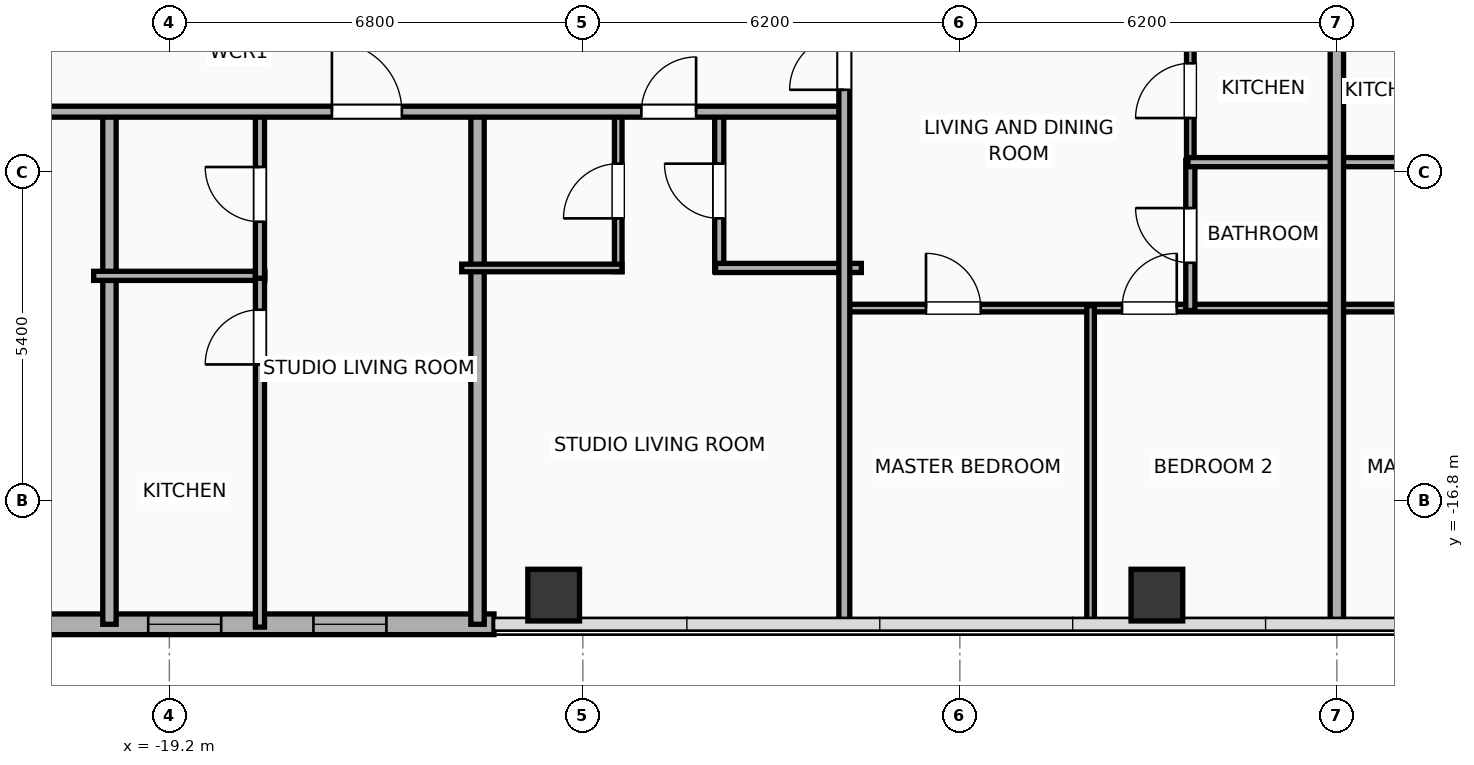
"""IFC4 building model, lengths in metres.
Left out: names, types, materials, properties, quantities, classifications, styles, units other than length and angle.
Written with IfcOpenShell. Run it as: python <this file> out.ifc"""

import sys

from ifc_helpers import new_model, si_unit, direction, frame, frame_2d, origin, origin_2d, place, context, subcontext, project, spatial, rectangle, hollow_rectangle, extrude, element, fill, save


model = new_model("IFC4")
c1 = context("Model", 3, precision=1e-05, world=origin(), true_north=direction((0.0, 1.0)))
c2 = subcontext(c1, "Body", "Model", "MODEL_VIEW")
j1 = project(units=[si_unit("LENGTHUNIT", "METRE"), si_unit("PLANEANGLEUNIT", "RADIAN")], contexts=[c1])
p1 = place(None, origin())
s1 = spatial("IfcSite", under=j1, at=p1, CompositionType="ELEMENT")
p2 = place(p1, origin())
s2 = spatial("IfcBuilding", under=s1, at=p2, CompositionType="ELEMENT")
p3 = place(p2, frame((0.0, 0.0, 208.0)))
s3 = spatial("IfcBuildingStorey", under=s2, at=p3, CompositionType="ELEMENT", Elevation=208.0)
for number, where, z_axis, x_axis in (
    (1, (-12.88, -18.35, 0.0), (0.0, 0.0, 1.0), (1.0, 0.0, 0.0)),
    (2, (-2.96, -18.35, 0.0), (0.0, 0.0, 1.0), (1.0, 0.0, 0.0)),
):
    element("IfcColumn", number, at=place(p3, frame(where, z_axis=z_axis, x_axis=x_axis)), inside=s3, PredefinedType="COLUMN", context=c2, shape_type="SweptSolid", body=[
        extrude(hollow_rectangle(XDim=0.85, YDim=0.85, WallThickness=0.028, at=origin_2d()), origin(), (0.0, 0.0, 1.0), 3.9),
    ])
p4 = place(p3, frame((-13.861, -18.83, 0.0), z_axis=(0.0, 0.0, 1.0), x_axis=(-1.0, 0.0, 0.0)))
e3 = element("IfcWall", 3, at=p4, inside=s3, PredefinedType="ELEMENTEDWALL", context=c2, shape_type="SweptSolid", body=[
    extrude(rectangle(XDim=8.922, YDim=0.34, at=frame_2d((4.461, 0.0))), origin(), (0.0, 0.0, 1.0), 3.65),
])
p5 = place(p4, frame((1.769, 0.0, 0.75)))
e4 = element("IfcOpeningElement", 4, at=p5, cuts=e3, PredefinedType="OPENING", context=c2, shape_type="SweptSolid", body=[
    extrude(rectangle(XDim=1.2, YDim=2.05, at=frame_2d((0.6, 1.025))), frame((0.0, 0.18, 0.0), z_axis=(0.0, -1.0, 0.0), x_axis=(1.0, 0.0, 0.0)), (0.0, 0.0, 1.0), 0.36),
])
p6 = place(p4, frame((4.486, 0.0, 0.75)))
e5 = element("IfcOpeningElement", 5, at=p6, cuts=e3, PredefinedType="OPENING", context=c2, shape_type="SweptSolid", body=[
    extrude(rectangle(XDim=1.2, YDim=2.05, at=frame_2d((0.6, 1.025))), frame((0.0, 0.18, 0.0), z_axis=(0.0, -1.0, 0.0), x_axis=(1.0, 0.0, 0.0)), (0.0, 0.0, 1.0), 0.36),
])
p7 = place(p3, frame((-20.185, -18.83, 0.0), z_axis=(0.0, 0.0, 1.0), x_axis=(0.0, 1.0, 0.0)))
e6 = element("IfcWall", 6, at=p7, inside=s3, PredefinedType="PARTITIONING", context=c2, shape_type="SweptSolid", body=[
    extrude(rectangle(XDim=8.51, YDim=0.22, at=frame_2d((4.255, 0.0))), origin(), (0.0, 0.0, 1.0), 3.09),
])
p8 = place(p3, frame((-20.445, -13.1, 0.0), z_axis=(0.0, 0.0, 1.0), x_axis=(1.0, 0.0, 0.0)))
e7 = element("IfcWall", 7, at=p8, inside=s3, PredefinedType="PLUMBINGWALL", context=c2, shape_type="SweptSolid", body=[
    extrude(rectangle(XDim=2.815, YDim=0.15, at=frame_2d((1.408, 0.0))), origin(), (0.0, 0.0, 1.0), 3.65),
])
p9 = place(p3, frame((-17.71, -18.877, 0.0), z_axis=(0.0, 0.0, 1.0), x_axis=(0.0, 1.0, 0.0)))
e8 = element("IfcWall", 8, at=p9, inside=s3, PredefinedType="PLUMBINGWALL", context=c2, shape_type="SweptSolid", body=[
    extrude(rectangle(XDim=5.817, YDim=0.15, at=frame_2d((2.908, 0.0))), origin(), (0.0, 0.0, 1.0), 3.65),
])
p10 = place(p9, frame((4.32, 0.0, 0.0)))
e9 = element("IfcOpeningElement", 9, at=p10, cuts=e8, PredefinedType="OPENING", context=c2, shape_type="SweptSolid", body=[
    extrude(rectangle(XDim=0.9, YDim=2.05, at=frame_2d((0.45, 1.025))), frame((0.0, 0.085, 0.0), z_axis=(0.0, -1.0, 0.0), x_axis=(1.0, 0.0, 0.0)), (0.0, 0.0, 1.0), 0.17),
])
p11 = place(p3, frame((-17.71, -13.14, 0.0), z_axis=(0.0, 0.0, 1.0), x_axis=(0.0, 1.0, 0.0)))
e10 = element("IfcWall", 10, at=p11, inside=s3, PredefinedType="PLUMBINGWALL", context=c2, shape_type="SweptSolid", body=[
    extrude(rectangle(XDim=2.76, YDim=0.15, at=frame_2d((1.38, 0.0))), origin(), (0.0, 0.0, 1.0), 3.65),
])
p12 = place(p11, frame((0.93, 0.0, 0.0)))
e11 = element("IfcOpeningElement", 11, at=p12, cuts=e10, PredefinedType="OPENING", context=c2, shape_type="SweptSolid", body=[
    extrude(rectangle(XDim=0.9, YDim=2.05, at=frame_2d((0.45, 1.025))), frame((0.0, 0.085, 0.0), z_axis=(0.0, -1.0, 0.0), x_axis=(1.0, 0.0, 0.0)), (0.0, 0.0, 1.0), 0.17),
])
p13 = place(p3, frame((-14.132, -18.83, 0.0), z_axis=(0.0, 0.0, 1.0), x_axis=(0.0, 1.0, 0.0)))
e12 = element("IfcWall", 12, at=p13, inside=s3, PredefinedType="PARTITIONING", context=c2, shape_type="SweptSolid", body=[
    extrude(rectangle(XDim=8.51, YDim=0.22, at=frame_2d((4.255, 0.0))), origin(), (0.0, 0.0, 1.0), 3.65),
])
p14 = place(p3, frame((-11.818, -13.03, 0.0), z_axis=(0.0, 0.0, 1.0), x_axis=(0.0, 1.0, 0.0)))
e13 = element("IfcWall", 13, at=p14, inside=s3, PredefinedType="PARTITIONING", context=c2, shape_type="SweptSolid", body=[
    extrude(rectangle(XDim=2.65, YDim=0.125, at=frame_2d((1.325, 0.0))), origin(), (0.0, 0.0, 1.0), 3.65),
])
p15 = place(p14, frame((0.875, 0.0, 0.0)))
e14 = element("IfcOpeningElement", 14, at=p15, cuts=e13, PredefinedType="OPENING", context=c2, shape_type="SweptSolid", body=[
    extrude(rectangle(XDim=0.9, YDim=2.05, at=frame_2d((0.45, 1.025))), frame((0.0, 0.073, 0.0), z_axis=(0.0, -1.0, 0.0), x_axis=(1.0, 0.0, 0.0)), (0.0, 0.0, 1.0), 0.145),
])
p16 = place(p3, frame((-10.157, -13.03, 0.0), z_axis=(0.0, 0.0, 1.0), x_axis=(0.0, 1.0, 0.0)))
e15 = element("IfcWall", 15, at=p16, inside=s3, PredefinedType="PLUMBINGWALL", context=c2, shape_type="SweptSolid", body=[
    extrude(rectangle(XDim=2.65, YDim=0.15, at=frame_2d((1.325, 0.0))), origin(), (0.0, 0.0, 1.0), 3.65),
])
p17 = place(p16, frame((0.875, 0.0, 0.0)))
e16 = element("IfcOpeningElement", 16, at=p17, cuts=e15, PredefinedType="OPENING", context=c2, shape_type="SweptSolid", body=[
    extrude(rectangle(XDim=0.9, YDim=2.05, at=frame_2d((0.45, 1.025))), frame((0.0, 0.085, 0.0), z_axis=(0.0, -1.0, 0.0), x_axis=(1.0, 0.0, 0.0)), (0.0, 0.0, 1.0), 0.17),
])
p18 = place(p3, frame((-14.392, -12.97, 0.0), z_axis=(0.0, 0.0, 1.0), x_axis=(1.0, 0.0, 0.0)))
e17 = element("IfcWall", 17, at=p18, inside=s3, PredefinedType="PARTITIONING", context=c2, shape_type="SweptSolid", body=[
    extrude(rectangle(XDim=2.634, YDim=0.125, at=frame_2d((1.317, 0.0))), origin(), (0.0, 0.0, 1.0), 3.65),
])
p19 = place(p3, frame((-10.217, -12.97, 0.0), z_axis=(0.0, 0.0, 1.0), x_axis=(1.0, 0.0, 0.0)))
e18 = element("IfcWall", 18, at=p19, inside=s3, PredefinedType="PLUMBINGWALL", context=c2, shape_type="SweptSolid", body=[
    extrude(rectangle(XDim=2.397, YDim=0.15, at=frame_2d((1.198, 0.0))), origin(), (0.0, 0.0, 1.0), 3.65),
])
p20 = place(p3, frame((-26.23, -10.4, 0.0), z_axis=(0.0, 0.0, 1.0), x_axis=(1.0, 0.0, 0.0)))
e19 = element("IfcWall", 19, at=p20, inside=s3, PredefinedType="PARTITIONING", context=c2, shape_type="SweptSolid", body=[
    extrude(rectangle(XDim=18.15, YDim=0.18, at=frame_2d((9.075, 0.0))), origin(), (0.0, 0.0, 1.0), 3.65),
])
p21 = place(p20, frame((2.414, 0.0, 0.0)))
e20 = element("IfcOpeningElement", 20, at=p21, cuts=e19, PredefinedType="OPENING", context=c2, shape_type="SweptSolid", body=[
    extrude(rectangle(XDim=1.15, YDim=2.05, at=frame_2d((0.575, 1.025))), frame((0.0, 0.1, 0.0), z_axis=(0.0, -1.0, 0.0), x_axis=(1.0, 0.0, 0.0)), (0.0, 0.0, 1.0), 0.2),
])
p22 = place(p20, frame((9.703, 0.0, 0.0)))
e21 = element("IfcOpeningElement", 21, at=p22, cuts=e19, PredefinedType="OPENING", context=c2, shape_type="SweptSolid", body=[
    extrude(rectangle(XDim=1.15, YDim=2.05, at=frame_2d((0.575, 1.025))), frame((0.0, 0.1, 0.0), z_axis=(0.0, -1.0, 0.0), x_axis=(1.0, 0.0, 0.0)), (0.0, 0.0, 1.0), 0.2),
])
p23 = place(p20, frame((14.792, 0.0, 0.0)))
e22 = element("IfcOpeningElement", 22, at=p23, cuts=e19, PredefinedType="OPENING", context=c2, shape_type="SweptSolid", body=[
    extrude(rectangle(XDim=0.9, YDim=2.05, at=frame_2d((0.45, 1.025))), frame((0.0, 0.1, 0.0), z_axis=(0.0, -1.0, 0.0), x_axis=(1.0, 0.0, 0.0)), (0.0, 0.0, 1.0), 0.2),
])
p24 = place(p3, frame((-8.08, -13.63, 0.0), z_axis=(0.0, 0.0, 1.0), x_axis=(1.0, 0.0, 0.0)))
e23 = element("IfcWall", 23, at=p24, inside=s3, PredefinedType="PARTITIONING", context=c2, shape_type="SweptSolid", body=[
    extrude(rectangle(XDim=8.06, YDim=0.125, at=frame_2d((4.03, 0.0))), origin(), (0.0, 0.0, 1.0), 3.65),
])
p25 = place(p24, frame((1.323, 0.0, 0.0)))
e24 = element("IfcOpeningElement", 24, at=p25, cuts=e23, PredefinedType="OPENING", context=c2, shape_type="SweptSolid", body=[
    extrude(rectangle(XDim=0.9, YDim=2.05, at=frame_2d((0.45, 1.025))), frame((0.0, 0.073, 0.0), z_axis=(0.0, -1.0, 0.0), x_axis=(1.0, 0.0, 0.0)), (0.0, 0.0, 1.0), 0.145),
])
p26 = place(p24, frame((4.547, 0.0, 0.0)))
e25 = element("IfcOpeningElement", 25, at=p26, cuts=e23, PredefinedType="OPENING", context=c2, shape_type="SweptSolid", body=[
    extrude(rectangle(XDim=0.9, YDim=2.05, at=frame_2d((0.45, 1.025))), frame((0.0, 0.073, 0.0), z_axis=(0.0, -1.0, 0.0), x_axis=(1.0, 0.0, 0.0)), (0.0, 0.0, 1.0), 0.145),
])
p27 = place(p3, frame((-2.41, -11.26, 0.0), z_axis=(0.0, 0.0, 1.0), x_axis=(0.0, 1.0, 0.0)))
e26 = element("IfcWall", 26, at=p27, inside=s3, PredefinedType="PARTITIONING", context=c2, shape_type="SweptSolid", body=[
    extrude(rectangle(XDim=2.41, YDim=0.125, at=frame_2d((1.205, 0.0))), origin(), (0.0, 0.0, 1.0), 3.65),
])
p28 = place(p27, frame((0.755, 0.0, 0.0)))
e27 = element("IfcOpeningElement", 27, at=p28, cuts=e26, PredefinedType="OPENING", context=c2, shape_type="SweptSolid", body=[
    extrude(rectangle(XDim=0.9, YDim=2.05, at=frame_2d((0.45, 1.025))), frame((0.0, 0.073, 0.0), z_axis=(0.0, -1.0, 0.0), x_axis=(1.0, 0.0, 0.0)), (0.0, 0.0, 1.0), 0.145),
])
p29 = place(p3, frame((-2.41, -13.67, 0.0), z_axis=(0.0, 0.0, 1.0), x_axis=(0.0, 1.0, 0.0)))
e28 = element("IfcWall", 28, at=p29, inside=s3, PredefinedType="PLUMBINGWALL", context=c2, shape_type="SweptSolid", body=[
    extrude(rectangle(XDim=2.47, YDim=0.15, at=frame_2d((1.235, 0.0))), origin(), (0.0, 0.0, 1.0), 3.65),
])
p30 = place(p29, frame((0.785, 0.0, 0.0)))
e29 = element("IfcOpeningElement", 29, at=p30, cuts=e28, PredefinedType="OPENING", context=c2, shape_type="SweptSolid", body=[
    extrude(rectangle(XDim=0.9, YDim=2.05, at=frame_2d((0.45, 1.025))), frame((0.0, 0.085, 0.0), z_axis=(0.0, -1.0, 0.0), x_axis=(1.0, 0.0, 0.0)), (0.0, 0.0, 1.0), 0.17),
])
p31 = place(p3, frame((-2.45, -11.23, 0.0), z_axis=(0.0, 0.0, 1.0), x_axis=(1.0, 0.0, 0.0)))
e30 = element("IfcWall", 30, at=p31, inside=s3, PredefinedType="PLUMBINGWALL", context=c2, shape_type="SweptSolid", body=[
    extrude(rectangle(XDim=2.43, YDim=0.15, at=frame_2d((1.215, 0.0))), origin(), (0.0, 0.0, 1.0), 3.65),
])
p32 = place(p3, frame((-4.05, -18.83, 0.0), z_axis=(0.0, 0.0, 1.0), x_axis=(0.0, 1.0, 0.0)))
e31 = element("IfcWall", 31, at=p32, inside=s3, PredefinedType="PARTITIONING", context=c2, shape_type="SweptSolid", body=[
    extrude(rectangle(XDim=5.24, YDim=0.125, at=frame_2d((2.62, 0.0))), origin(), (0.0, 0.0, 1.0), 3.65),
])
p33 = place(p3, frame((-8.1, -18.83, 0.0), z_axis=(0.0, 0.0, 1.0), x_axis=(0.0, 1.0, 0.0)))
e32 = element("IfcWall", 32, at=p33, inside=s3, PredefinedType="PARTITIONING", context=c2, shape_type="SweptSolid", body=[
    extrude(rectangle(XDim=10.04, YDim=0.18, at=frame_2d((5.02, 0.0))), origin(), (0.0, 0.0, 1.0), 3.65),
])
p34 = place(p33, frame((8.79, 0.0, 0.0)))
e33 = element("IfcOpeningElement", 33, at=p34, cuts=e32, PredefinedType="OPENING", context=c2, shape_type="SweptSolid", body=[
    extrude(rectangle(XDim=0.9, YDim=2.05, at=frame_2d((0.45, 1.025))), frame((0.0, 0.1, 0.0), z_axis=(0.0, -1.0, 0.0), x_axis=(1.0, 0.0, 0.0)), (0.0, 0.0, 1.0), 0.2),
])
p35 = place(p3, frame((0.02, -13.63, 0.0), z_axis=(0.0, 0.0, 1.0), x_axis=(1.0, 0.0, 0.0)))
e34 = element("IfcWall", 34, at=p35, inside=s3, PredefinedType="PARTITIONING", context=c2, shape_type="SweptSolid", body=[
    extrude(rectangle(XDim=8.06, YDim=0.125, at=frame_2d((4.03, 0.0))), origin(), (0.0, 0.0, 1.0), 3.65),
])
p36 = place(p35, frame((1.323, 0.0, 0.0)))
e35 = element("IfcOpeningElement", 35, at=p36, cuts=e34, PredefinedType="OPENING", context=c2, shape_type="SweptSolid", body=[
    extrude(rectangle(XDim=0.9, YDim=2.05, at=frame_2d((0.45, 1.025))), frame((0.0, 0.073, 0.0), z_axis=(0.0, -1.0, 0.0), x_axis=(1.0, 0.0, 0.0)), (0.0, 0.0, 1.0), 0.145),
])
p37 = place(p35, frame((5.837, 0.0, 0.0)))
e36 = element("IfcOpeningElement", 36, at=p37, cuts=e34, PredefinedType="OPENING", context=c2, shape_type="SweptSolid", body=[
    extrude(rectangle(XDim=0.9, YDim=2.05, at=frame_2d((0.45, 1.025))), frame((0.0, 0.073, 0.0), z_axis=(0.0, -1.0, 0.0), x_axis=(1.0, 0.0, 0.0)), (0.0, 0.0, 1.0), 0.145),
])
p38 = place(p3, frame((0.02, -11.23, 0.0), z_axis=(0.0, 0.0, 1.0), x_axis=(1.0, 0.0, 0.0)))
e37 = element("IfcWall", 37, at=p38, inside=s3, PredefinedType="PLUMBINGWALL", context=c2, shape_type="SweptSolid", body=[
    extrude(rectangle(XDim=2.43, YDim=0.15, at=frame_2d((1.215, 0.0))), origin(), (0.0, 0.0, 1.0), 3.65),
])
p39 = place(p3, frame((0.0, -18.83, 0.0), z_axis=(0.0, 0.0, 1.0), x_axis=(0.0, 1.0, 0.0)))
e38 = element("IfcWall", 38, at=p39, inside=s3, PredefinedType="PARTITIONING", context=c2, shape_type="SweptSolid", body=[
    extrude(rectangle(XDim=10.04, YDim=0.22, at=frame_2d((5.02, 0.0))), origin(), (0.0, 0.0, 1.0), 3.65),
])
p40 = place(p5, origin())
e39 = element("IfcWindow", 39, at=p40, inside=s3, PartitioningType="SINGLE_PANEL", PredefinedType="WINDOW", context=c2, shape_type="SweptSolid", body=[
    extrude(rectangle(XDim=1.2, YDim=2.05, at=frame_2d((0.6, 1.025))), frame((0.0, 0.03, 0.0), z_axis=(0.0, -1.0, 0.0), x_axis=(1.0, 0.0, 0.0)), (0.0, 0.0, 1.0), 0.06),
])
fill(e4, e39)
p41 = place(p6, origin())
e40 = element("IfcWindow", 40, at=p41, inside=s3, PartitioningType="SINGLE_PANEL", PredefinedType="WINDOW", context=c2, shape_type="SweptSolid", body=[
    extrude(rectangle(XDim=1.2, YDim=2.05, at=frame_2d((0.6, 1.025))), frame((0.0, 0.03, 0.0), z_axis=(0.0, -1.0, 0.0), x_axis=(1.0, 0.0, 0.0)), (0.0, 0.0, 1.0), 0.06),
])
fill(e5, e40)
p42 = place(p10, origin())
e41 = element("IfcDoor", 41, at=p42, inside=s3, OperationType="SINGLE_SWING_LEFT", PredefinedType="DOOR", context=c2, shape_type="SweptSolid", body=[
    extrude(rectangle(XDim=0.9, YDim=2.05, at=frame_2d((0.45, 1.025))), frame((0.0, 0.025, 0.0), z_axis=(0.0, -1.0, 0.0), x_axis=(1.0, 0.0, 0.0)), (0.0, 0.0, 1.0), 0.05),
])
fill(e9, e41)
p43 = place(p12, origin())
e42 = element("IfcDoor", 42, at=p43, inside=s3, OperationType="SINGLE_SWING_RIGHT", PredefinedType="DOOR", context=c2, shape_type="SweptSolid", body=[
    extrude(rectangle(XDim=0.9, YDim=2.05, at=frame_2d((0.45, 1.025))), frame((0.0, 0.025, 0.0), z_axis=(0.0, -1.0, 0.0), x_axis=(1.0, 0.0, 0.0)), (0.0, 0.0, 1.0), 0.05),
])
fill(e11, e42)
p44 = place(p15, origin())
e43 = element("IfcDoor", 43, at=p44, inside=s3, OperationType="SINGLE_SWING_LEFT", PredefinedType="DOOR", context=c2, shape_type="SweptSolid", body=[
    extrude(rectangle(XDim=0.9, YDim=2.05, at=frame_2d((0.45, 1.025))), frame((0.0, 0.025, 0.0), z_axis=(0.0, -1.0, 0.0), x_axis=(1.0, 0.0, 0.0)), (0.0, 0.0, 1.0), 0.05),
])
fill(e14, e43)
p45 = place(p17, origin())
e44 = element("IfcDoor", 44, at=p45, inside=s3, OperationType="SINGLE_SWING_RIGHT", PredefinedType="DOOR", context=c2, shape_type="SweptSolid", body=[
    extrude(rectangle(XDim=0.9, YDim=2.05, at=frame_2d((0.45, 1.025))), frame((0.0, 0.025, 0.0), z_axis=(0.0, -1.0, 0.0), x_axis=(1.0, 0.0, 0.0)), (0.0, 0.0, 1.0), 0.05),
])
fill(e16, e44)
p46 = place(p22, origin())
e45 = element("IfcDoor", 45, at=p46, inside=s3, OperationType="SINGLE_SWING_LEFT", PredefinedType="DOOR", context=c2, shape_type="SweptSolid", body=[
    extrude(rectangle(XDim=1.15, YDim=2.05, at=frame_2d((0.575, 1.025))), frame((0.0, 0.025, 0.0), z_axis=(0.0, -1.0, 0.0), x_axis=(1.0, 0.0, 0.0)), (0.0, 0.0, 1.0), 0.05),
])
fill(e21, e45)
p47 = place(p23, origin())
e46 = element("IfcDoor", 46, at=p47, inside=s3, OperationType="SINGLE_SWING_RIGHT", PredefinedType="DOOR", context=c2, shape_type="SweptSolid", body=[
    extrude(rectangle(XDim=0.9, YDim=2.05, at=frame_2d((0.45, 1.025))), frame((0.0, 0.025, 0.0), z_axis=(0.0, -1.0, 0.0), x_axis=(1.0, 0.0, 0.0)), (0.0, 0.0, 1.0), 0.05),
])
fill(e22, e46)
p48 = place(p25, origin())
e47 = element("IfcDoor", 47, at=p48, inside=s3, OperationType="SINGLE_SWING_LEFT", PredefinedType="DOOR", context=c2, shape_type="SweptSolid", body=[
    extrude(rectangle(XDim=0.9, YDim=2.05, at=frame_2d((0.45, 1.025))), frame((0.0, 0.025, 0.0), z_axis=(0.0, -1.0, 0.0), x_axis=(1.0, 0.0, 0.0)), (0.0, 0.0, 1.0), 0.05),
])
fill(e24, e47)
p49 = place(p26, origin())
e48 = element("IfcDoor", 48, at=p49, inside=s3, OperationType="SINGLE_SWING_RIGHT", PredefinedType="DOOR", context=c2, shape_type="SweptSolid", body=[
    extrude(rectangle(XDim=0.9, YDim=2.05, at=frame_2d((0.45, 1.025))), frame((0.0, 0.025, 0.0), z_axis=(0.0, -1.0, 0.0), x_axis=(1.0, 0.0, 0.0)), (0.0, 0.0, 1.0), 0.05),
])
fill(e25, e48)
p50 = place(p28, origin())
e49 = element("IfcDoor", 49, at=p50, inside=s3, OperationType="SINGLE_SWING_LEFT", PredefinedType="DOOR", context=c2, shape_type="SweptSolid", body=[
    extrude(rectangle(XDim=0.9, YDim=2.05, at=frame_2d((0.45, 1.025))), frame((0.0, 0.025, 0.0), z_axis=(0.0, -1.0, 0.0), x_axis=(1.0, 0.0, 0.0)), (0.0, 0.0, 1.0), 0.05),
])
fill(e27, e49)
p51 = place(p30, origin())
e50 = element("IfcDoor", 50, at=p51, inside=s3, OperationType="SINGLE_SWING_RIGHT", PredefinedType="DOOR", context=c2, shape_type="SweptSolid", body=[
    extrude(rectangle(XDim=0.9, YDim=2.05, at=frame_2d((0.45, 1.025))), frame((0.0, 0.025, 0.0), z_axis=(0.0, -1.0, 0.0), x_axis=(1.0, 0.0, 0.0)), (0.0, 0.0, 1.0), 0.05),
])
fill(e29, e50)
p52 = place(p34, origin())
e51 = element("IfcDoor", 51, at=p52, inside=s3, OperationType="SINGLE_SWING_LEFT", PredefinedType="DOOR", context=c2, shape_type="SweptSolid", body=[
    extrude(rectangle(XDim=0.9, YDim=2.05, at=frame_2d((0.45, 1.025))), frame((0.0, 0.025, 0.0), z_axis=(0.0, -1.0, 0.0), x_axis=(1.0, 0.0, 0.0)), (0.0, 0.0, 1.0), 0.05),
])
fill(e33, e51)
save(model, sys.argv[1])
